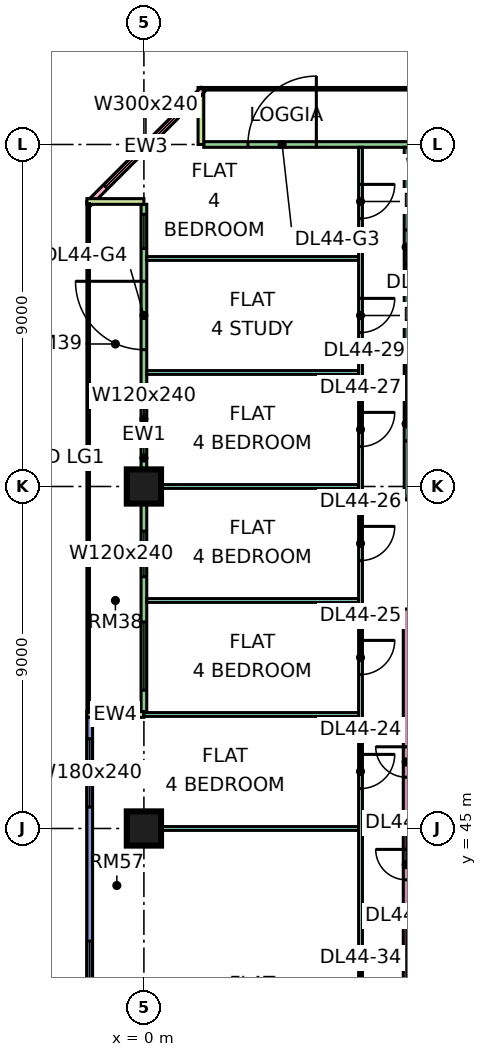
"""IFC4 building model, lengths in metres.
Left out: names, types, materials, properties, quantities, classifications, styles, units other than length and angle.
Written with IfcOpenShell. Run it as: python <this file> out.ifc"""

import sys

from ifc_helpers import new_model, si_unit, direction, frame, frame_2d, origin, origin_2d, place, context, subcontext, project, spatial, rectangle, extrude, element, fill, save


model = new_model("IFC4")
c1 = context("Model", 3, precision=1e-05, world=origin(), true_north=direction((0.0, 1.0)))
c2 = subcontext(c1, "Body", "Model", "MODEL_VIEW")
j1 = project(units=[si_unit("LENGTHUNIT", "METRE"), si_unit("PLANEANGLEUNIT", "RADIAN")], contexts=[c1])
p1 = place(None, origin())
s1 = spatial("IfcSite", under=j1, at=p1, CompositionType="ELEMENT")
p2 = place(p1, origin())
s2 = spatial("IfcBuilding", under=s1, at=p2, CompositionType="ELEMENT")
p3 = place(p2, frame((0.0, 0.0, 191.15)))
s3 = spatial("IfcBuildingStorey", under=s2, at=p3, CompositionType="ELEMENT", Elevation=191.15)
p4 = place(p3, frame((0.0, 45.0, 0.0), z_axis=(0.0, 0.0, 1.0), x_axis=(1.0, 0.0, 0.0)))
e1 = element("IfcColumn", 1, at=p4, inside=s3, PredefinedType="COLUMN", context=c2, shape_type="SweptSolid", body=[
    extrude(rectangle(XDim=0.9, YDim=0.9, at=origin_2d()), origin(), (0.0, 0.0, 1.0), 3.75),
])
p5 = place(p3, frame((0.0, 54.0, 0.0), z_axis=(0.0, 0.0, 1.0), x_axis=(1.0, 0.0, 0.0)))
e2 = element("IfcColumn", 2, at=p5, inside=s3, PredefinedType="COLUMN", context=c2, shape_type="SweptSolid", body=[
    extrude(rectangle(XDim=0.9, YDim=0.9, at=origin_2d()), origin(), (0.0, 0.0, 1.0), 3.75),
])
p6 = place(p3, frame((11.925, 63.0, 0.0), z_axis=(0.0, 0.0, 1.0), x_axis=(-1.0, 0.0, 0.0)))
e3 = element("IfcWall", 3, at=p6, inside=s3, PredefinedType="SOLIDWALL", context=c2, shape_type="SweptSolid", body=[
    extrude(rectangle(XDim=10.35, YDim=0.15, at=frame_2d((5.175, 0.0))), origin(), (0.0, 0.0, 1.0), 3.35),
])
p7 = place(p6, frame((2.775, 0.0, 0.45)))
e4 = element("IfcOpeningElement", 4, at=p7, cuts=e3, PredefinedType="OPENING", context=c2, shape_type="SweptSolid", body=[
    extrude(rectangle(XDim=1.8, YDim=2.4, at=frame_2d((0.9, 1.2))), frame((0.0, 0.085, 0.0), z_axis=(0.0, -1.0, 0.0), x_axis=(1.0, 0.0, 0.0)), (0.0, 0.0, 1.0), 0.17),
])
p8 = place(p6, frame((7.387, 0.0, 0.0)))
e5 = element("IfcOpeningElement", 5, at=p8, cuts=e3, PredefinedType="OPENING", context=c2, shape_type="SweptSolid", body=[
    extrude(rectangle(XDim=1.8, YDim=2.4, at=frame_2d((0.9, 1.2))), frame((0.0, 0.085, 0.0), z_axis=(0.0, -1.0, 0.0), x_axis=(1.0, 0.0, 0.0)), (0.0, 0.0, 1.0), 0.17),
])
p9 = place(p3, frame((1.5, 64.5, 0.0), z_axis=(0.0, 0.0, 1.0), x_axis=(0.0, -1.0, 0.0)))
e6 = element("IfcWall", 6, at=p9, inside=s3, PredefinedType="SOLIDWALL", context=c2, shape_type="SweptSolid", body=[
    extrude(rectangle(XDim=1.5, YDim=0.15, at=frame_2d((0.75, 0.0))), origin(), (0.0, 0.0, 1.0), 3.35),
])
p10 = place(p3, frame((1.553, 64.447, 0.0), z_axis=(0.0, 0.0, 1.0), x_axis=(-0.707106781187, -0.707106781187, 0.0)))
e7 = element("IfcWall", 7, at=p10, inside=s3, PredefinedType="SOLIDWALL", context=c2, shape_type="SweptSolid", body=[
    extrude(rectangle(XDim=4.243, YDim=0.15, at=frame_2d((2.121, 0.0))), origin(), (0.0, 0.0, 1.0), 3.35),
])
p11 = place(p10, frame((0.621, 0.0, 0.45)))
e8 = element("IfcOpeningElement", 8, at=p11, cuts=e7, PredefinedType="OPENING", context=c2, shape_type="SweptSolid", body=[
    extrude(rectangle(XDim=3.0, YDim=2.4, at=frame_2d((1.5, 1.2))), frame((0.0, 0.085, 0.0), z_axis=(0.0, -1.0, 0.0), x_axis=(1.0, 0.0, 0.0)), (0.0, 0.0, 1.0), 0.17),
])
p12 = place(p3, frame((0.0, 61.425, 0.0), z_axis=(0.0, 0.0, 1.0), x_axis=(0.0, -1.0, 0.0)))
e9 = element("IfcWall", 9, at=p12, inside=s3, PredefinedType="SOLIDWALL", context=c2, shape_type="SweptSolid", body=[
    extrude(rectangle(XDim=13.35, YDim=0.15, at=frame_2d((6.675, 0.0))), origin(), (0.0, 0.0, 1.0), 3.35),
])
p13 = place(p12, frame((0.262, 0.0, 0.45)))
e10 = element("IfcOpeningElement", 10, at=p13, cuts=e9, PredefinedType="OPENING", context=c2, shape_type="SweptSolid", body=[
    extrude(rectangle(XDim=0.9, YDim=2.4, at=frame_2d((0.45, 1.2))), frame((0.0, 0.085, 0.0), z_axis=(0.0, -1.0, 0.0), x_axis=(1.0, 0.0, 0.0)), (0.0, 0.0, 1.0), 0.17),
])
p14 = place(p12, frame((2.025, 0.0, 0.0)))
e11 = element("IfcOpeningElement", 11, at=p14, cuts=e9, PredefinedType="OPENING", context=c2, shape_type="SweptSolid", body=[
    extrude(rectangle(XDim=1.8, YDim=2.4, at=frame_2d((0.9, 1.2))), frame((0.0, 0.085, 0.0), z_axis=(0.0, -1.0, 0.0), x_axis=(1.0, 0.0, 0.0)), (0.0, 0.0, 1.0), 0.17),
])
p15 = place(p12, frame((5.05, 0.0, 0.45)))
e12 = element("IfcOpeningElement", 12, at=p15, cuts=e9, PredefinedType="OPENING", context=c2, shape_type="SweptSolid", body=[
    extrude(rectangle(XDim=1.2, YDim=2.4, at=frame_2d((0.6, 1.2))), frame((0.0, 0.085, 0.0), z_axis=(0.0, -1.0, 0.0), x_axis=(1.0, 0.0, 0.0)), (0.0, 0.0, 1.0), 0.17),
])
p16 = place(p12, frame((8.6, 0.0, 0.45)))
e13 = element("IfcOpeningElement", 13, at=p16, cuts=e9, PredefinedType="OPENING", context=c2, shape_type="SweptSolid", body=[
    extrude(rectangle(XDim=1.2, YDim=2.4, at=frame_2d((0.6, 1.2))), frame((0.0, 0.085, 0.0), z_axis=(0.0, -1.0, 0.0), x_axis=(1.0, 0.0, 0.0)), (0.0, 0.0, 1.0), 0.17),
])
p17 = place(p12, frame((10.988, 0.0, 0.45)))
e14 = element("IfcOpeningElement", 14, at=p17, cuts=e9, PredefinedType="OPENING", context=c2, shape_type="SweptSolid", body=[
    extrude(rectangle(XDim=1.8, YDim=2.4, at=frame_2d((0.9, 1.2))), frame((0.0, 0.085, 0.0), z_axis=(0.0, -1.0, 0.0), x_axis=(1.0, 0.0, 0.0)), (0.0, 0.0, 1.0), 0.17),
])
for number, where, z_axis, x_axis in (
    (15, (-1.5, 61.5, 0.0), (0.0, 0.0, 1.0), (1.0, 0.0, 0.0)),
    (16, (-1.5, 48.0, 0.0), (0.0, 0.0, 1.0), (1.0, 0.0, 0.0)),
):
    element("IfcWall", number, at=place(p3, frame(where, z_axis=z_axis, x_axis=x_axis)), inside=s3, PredefinedType="SOLIDWALL", context=c2, shape_type="SweptSolid", body=[
        extrude(rectangle(XDim=1.5, YDim=0.15, at=frame_2d((0.75, 0.0))), origin(), (0.0, 0.0, 1.0), 3.35),
    ])
p18 = place(p3, frame((-1.425, 47.925, 0.0), z_axis=(0.0, 0.0, 1.0), x_axis=(0.0, -1.0, 0.0)))
e17 = element("IfcWall", 17, at=p18, inside=s3, PredefinedType="SOLIDWALL", context=c2, shape_type="SweptSolid", body=[
    extrude(rectangle(XDim=11.85, YDim=0.15, at=frame_2d((5.925, 0.0))), origin(), (0.0, 0.0, 1.0), 3.35),
])
p19 = place(p18, frame((0.562, 0.0, 0.45)))
e18 = element("IfcOpeningElement", 18, at=p19, cuts=e17, PredefinedType="OPENING", context=c2, shape_type="SweptSolid", body=[
    extrude(rectangle(XDim=1.8, YDim=2.4, at=frame_2d((0.9, 1.2))), frame((0.0, 0.085, 0.0), z_axis=(0.0, -1.0, 0.0), x_axis=(1.0, 0.0, 0.0)), (0.0, 0.0, 1.0), 0.17),
])
p20 = place(p18, frame((5.887, 0.0, 0.45)))
e19 = element("IfcOpeningElement", 19, at=p20, cuts=e17, PredefinedType="OPENING", context=c2, shape_type="SweptSolid", body=[
    extrude(rectangle(XDim=3.0, YDim=2.4, at=frame_2d((1.5, 1.2))), frame((0.0, 0.085, 0.0), z_axis=(0.0, -1.0, 0.0), x_axis=(1.0, 0.0, 0.0)), (0.0, 0.0, 1.0), 0.17),
])
e20 = element("IfcWall", 20, at=p4, inside=s3, PredefinedType="PARTITIONING", context=c2, shape_type="SweptSolid", body=[
    extrude(rectangle(XDim=5.65, YDim=0.1, at=frame_2d((2.825, 0.0))), origin(), (0.0, 0.0, 1.0), 3.35),
])
p21 = place(p3, frame((0.0, 48.0, 0.0), z_axis=(0.0, 0.0, 1.0), x_axis=(1.0, 0.0, 0.0)))
e21 = element("IfcWall", 21, at=p21, inside=s3, PredefinedType="PARTITIONING", context=c2, shape_type="SweptSolid", body=[
    extrude(rectangle(XDim=5.65, YDim=0.1, at=frame_2d((2.825, 0.0))), origin(), (0.0, 0.0, 1.0), 3.35),
])
for number, where, z_axis, x_axis in (
    (22, (0.074, 51.0, 0.0), (0.0, 0.0, 1.0), (1.0, 0.0, 0.0)),
    (23, (0.074, 54.0, 0.0), (0.0, 0.0, 1.0), (1.0, 0.0, 0.0)),
    (24, (0.074, 57.0, 0.0), (0.0, 0.0, 1.0), (1.0, 0.0, 0.0)),
    (25, (0.074, 60.0, 0.0), (0.0, 0.0, 1.0), (1.0, 0.0, 0.0)),
):
    element("IfcWall", number, at=place(p3, frame(where, z_axis=z_axis, x_axis=x_axis)), inside=s3, PredefinedType="PARTITIONING", context=c2, shape_type="SweptSolid", body=[
        extrude(rectangle(XDim=5.576, YDim=0.1, at=frame_2d((2.788, 0.0))), origin(), (0.0, 0.0, 1.0), 3.35),
    ])
p22 = place(p3, frame((5.7, 36.1, 0.0), z_axis=(0.0, 0.0, 1.0), x_axis=(0.0, 1.0, 0.0)))
e26 = element("IfcWall", 26, at=p22, inside=s3, PredefinedType="PARTITIONING", context=c2, shape_type="SweptSolid", body=[
    extrude(rectangle(XDim=26.826, YDim=0.1, at=frame_2d((13.413, 0.0))), origin(), (0.0, 0.0, 1.0), 3.35),
])
p23 = place(p22, frame((9.95, 0.0, 0.0)))
e27 = element("IfcOpeningElement", 27, at=p23, cuts=e26, PredefinedType="OPENING", context=c2, shape_type="SweptSolid", body=[
    extrude(rectangle(XDim=0.9, YDim=2.1, at=frame_2d((0.45, 1.05))), frame((0.0, 0.06, 0.0), z_axis=(0.0, -1.0, 0.0), x_axis=(1.0, 0.0, 0.0)), (0.0, 0.0, 1.0), 0.12),
])
p24 = place(p22, frame((12.95, 0.0, 0.0)))
e28 = element("IfcOpeningElement", 28, at=p24, cuts=e26, PredefinedType="OPENING", context=c2, shape_type="SweptSolid", body=[
    extrude(rectangle(XDim=0.9, YDim=2.1, at=frame_2d((0.45, 1.05))), frame((0.0, 0.06, 0.0), z_axis=(0.0, -1.0, 0.0), x_axis=(1.0, 0.0, 0.0)), (0.0, 0.0, 1.0), 0.12),
])
p25 = place(p22, frame((15.95, 0.0, 0.0)))
e29 = element("IfcOpeningElement", 29, at=p25, cuts=e26, PredefinedType="OPENING", context=c2, shape_type="SweptSolid", body=[
    extrude(rectangle(XDim=0.9, YDim=2.1, at=frame_2d((0.45, 1.05))), frame((0.0, 0.06, 0.0), z_axis=(0.0, -1.0, 0.0), x_axis=(1.0, 0.0, 0.0)), (0.0, 0.0, 1.0), 0.12),
])
p26 = place(p22, frame((18.95, 0.0, 0.0)))
e30 = element("IfcOpeningElement", 30, at=p26, cuts=e26, PredefinedType="OPENING", context=c2, shape_type="SweptSolid", body=[
    extrude(rectangle(XDim=0.9, YDim=2.1, at=frame_2d((0.45, 1.05))), frame((0.0, 0.06, 0.0), z_axis=(0.0, -1.0, 0.0), x_axis=(1.0, 0.0, 0.0)), (0.0, 0.0, 1.0), 0.12),
])
p27 = place(p22, frame((24.95, 0.0, 0.0)))
e31 = element("IfcOpeningElement", 31, at=p27, cuts=e26, PredefinedType="OPENING", context=c2, shape_type="SweptSolid", body=[
    extrude(rectangle(XDim=0.9, YDim=2.1, at=frame_2d((0.45, 1.05))), frame((0.0, 0.06, 0.0), z_axis=(0.0, -1.0, 0.0), x_axis=(1.0, 0.0, 0.0)), (0.0, 0.0, 1.0), 0.12),
])
p28 = place(p22, frame((3.95, 0.0, 0.0)))
e32 = element("IfcOpeningElement", 32, at=p28, cuts=e26, PredefinedType="OPENING", context=c2, shape_type="SweptSolid", body=[
    extrude(rectangle(XDim=0.9, YDim=2.1, at=frame_2d((0.45, 1.05))), frame((0.0, 0.06, 0.0), z_axis=(0.0, -1.0, 0.0), x_axis=(1.0, 0.0, 0.0)), (0.0, 0.0, 1.0), 0.12),
])
p29 = place(p22, frame((21.95, 0.0, 0.0)))
e33 = element("IfcOpeningElement", 33, at=p29, cuts=e26, PredefinedType="OPENING", context=c2, shape_type="SweptSolid", body=[
    extrude(rectangle(XDim=0.9, YDim=2.1, at=frame_2d((0.45, 1.05))), frame((0.0, 0.06, 0.0), z_axis=(0.0, -1.0, 0.0), x_axis=(1.0, 0.0, 0.0)), (0.0, 0.0, 1.0), 0.12),
])
p30 = place(p3, frame((6.9, 36.1, 0.0), z_axis=(0.0, 0.0, 1.0), x_axis=(0.0, 1.0, 0.0)))
e34 = element("IfcWall", 34, at=p30, inside=s3, PredefinedType="PARTITIONING", context=c2, shape_type="SweptSolid", body=[
    extrude(rectangle(XDim=14.675, YDim=0.15, at=frame_2d((7.337, 0.0))), origin(), (0.0, 0.0, 1.0), 3.35),
])
p31 = place(p30, frame((7.55, 0.0, 0.0)))
e35 = element("IfcOpeningElement", 35, at=p31, cuts=e34, PredefinedType="OPENING", context=c2, shape_type="SweptSolid", body=[
    extrude(rectangle(XDim=0.8, YDim=2.1, at=frame_2d((0.4, 1.05))), frame((0.0, 0.085, 0.0), z_axis=(0.0, -1.0, 0.0), x_axis=(1.0, 0.0, 0.0)), (0.0, 0.0, 1.0), 0.17),
])
p32 = place(p30, frame((0.65, 0.0, 0.0)))
e36 = element("IfcOpeningElement", 36, at=p32, cuts=e34, PredefinedType="OPENING", context=c2, shape_type="SweptSolid", body=[
    extrude(rectangle(XDim=0.8, YDim=2.1, at=frame_2d((0.4, 1.05))), frame((0.0, 0.085, 0.0), z_axis=(0.0, -1.0, 0.0), x_axis=(1.0, 0.0, 0.0)), (0.0, 0.0, 1.0), 0.17),
])
p33 = place(p30, frame((10.25, 0.0, 0.0)))
e37 = element("IfcOpeningElement", 37, at=p33, cuts=e34, PredefinedType="OPENING", context=c2, shape_type="SweptSolid", body=[
    extrude(rectangle(XDim=0.8, YDim=2.1, at=frame_2d((0.4, 1.05))), frame((0.0, 0.085, 0.0), z_axis=(0.0, -1.0, 0.0), x_axis=(1.0, 0.0, 0.0)), (0.0, 0.0, 1.0), 0.17),
])
p34 = place(p30, frame((3.95, 0.0, 0.0)))
e38 = element("IfcOpeningElement", 38, at=p34, cuts=e34, PredefinedType="OPENING", context=c2, shape_type="SweptSolid", body=[
    extrude(rectangle(XDim=0.9, YDim=2.1, at=frame_2d((0.45, 1.05))), frame((0.0, 0.085, 0.0), z_axis=(0.0, -1.0, 0.0), x_axis=(1.0, 0.0, 0.0)), (0.0, 0.0, 1.0), 0.17),
])
p35 = place(p3, frame((6.9, 53.65, 0.0), z_axis=(0.0, 0.0, 1.0), x_axis=(0.0, 1.0, 0.0)))
e39 = element("IfcWall", 39, at=p35, inside=s3, PredefinedType="PARTITIONING", context=c2, shape_type="SweptSolid", body=[
    extrude(rectangle(XDim=9.276, YDim=0.1, at=frame_2d((4.638, 0.0))), origin(), (0.0, 0.0, 1.0), 3.35),
])
p36 = place(p35, frame((1.55, 0.0, 0.0)))
e40 = element("IfcOpeningElement", 40, at=p36, cuts=e39, PredefinedType="OPENING", context=c2, shape_type="SweptSolid", body=[
    extrude(rectangle(XDim=0.9, YDim=2.1, at=frame_2d((0.45, 1.05))), frame((0.0, 0.06, 0.0), z_axis=(0.0, -1.0, 0.0), x_axis=(1.0, 0.0, 0.0)), (0.0, 0.0, 1.0), 0.12),
])
p37 = place(p35, frame((6.2, 0.0, 0.0)))
e41 = element("IfcOpeningElement", 41, at=p37, cuts=e39, PredefinedType="OPENING", context=c2, shape_type="SweptSolid", body=[
    extrude(rectangle(XDim=0.9, YDim=2.1, at=frame_2d((0.45, 1.05))), frame((0.0, 0.06, 0.0), z_axis=(0.0, -1.0, 0.0), x_axis=(1.0, 0.0, 0.0)), (0.0, 0.0, 1.0), 0.12),
])
p38 = place(p8, frame((1.8, 0.0, 0.0), z_axis=(0.0, 0.0, 1.0), x_axis=(-1.0, 0.0, 0.0)))
e42 = element("IfcDoor", 42, at=p38, inside=s3, OperationType="DOUBLE_DOOR_SINGLE_SWING", PredefinedType="DOOR", context=c2, shape_type="SweptSolid", body=[
    extrude(rectangle(XDim=1.8, YDim=2.4, at=frame_2d((0.9, 1.2))), frame((0.0, 0.025, 0.0), z_axis=(0.0, -1.0, 0.0), x_axis=(1.0, 0.0, 0.0)), (0.0, 0.0, 1.0), 0.05),
])
fill(e5, e42)
p39 = place(p11, origin())
e43 = element("IfcWindow", 43, at=p39, inside=s3, PartitioningType="SINGLE_PANEL", PredefinedType="WINDOW", context=c2, shape_type="SweptSolid", body=[
    extrude(rectangle(XDim=3.0, YDim=2.4, at=frame_2d((1.5, 1.2))), frame((0.0, 0.03, 0.0), z_axis=(0.0, -1.0, 0.0), x_axis=(1.0, 0.0, 0.0)), (0.0, 0.0, 1.0), 0.06),
])
fill(e8, e43)
p40 = place(p13, origin())
e44 = element("IfcWindow", 44, at=p40, inside=s3, PartitioningType="SINGLE_PANEL", PredefinedType="WINDOW", context=c2, shape_type="SweptSolid", body=[
    extrude(rectangle(XDim=0.9, YDim=2.4, at=frame_2d((0.45, 1.2))), frame((0.0, 0.03, 0.0), z_axis=(0.0, -1.0, 0.0), x_axis=(1.0, 0.0, 0.0)), (0.0, 0.0, 1.0), 0.06),
])
fill(e10, e44)
p41 = place(p14, frame((1.8, 0.0, 0.0), z_axis=(0.0, 0.0, 1.0), x_axis=(-1.0, 0.0, 0.0)))
e45 = element("IfcDoor", 45, at=p41, inside=s3, OperationType="DOUBLE_DOOR_SINGLE_SWING", PredefinedType="DOOR", context=c2, shape_type="SweptSolid", body=[
    extrude(rectangle(XDim=1.8, YDim=2.4, at=frame_2d((0.9, 1.2))), frame((0.0, 0.025, 0.0), z_axis=(0.0, -1.0, 0.0), x_axis=(1.0, 0.0, 0.0)), (0.0, 0.0, 1.0), 0.05),
])
fill(e11, e45)
p42 = place(p15, origin())
e46 = element("IfcWindow", 46, at=p42, inside=s3, PartitioningType="SINGLE_PANEL", PredefinedType="WINDOW", context=c2, shape_type="SweptSolid", body=[
    extrude(rectangle(XDim=1.2, YDim=2.4, at=frame_2d((0.6, 1.2))), frame((0.0, 0.03, 0.0), z_axis=(0.0, -1.0, 0.0), x_axis=(1.0, 0.0, 0.0)), (0.0, 0.0, 1.0), 0.06),
])
fill(e12, e46)
p43 = place(p16, origin())
e47 = element("IfcWindow", 47, at=p43, inside=s3, PartitioningType="SINGLE_PANEL", PredefinedType="WINDOW", context=c2, shape_type="SweptSolid", body=[
    extrude(rectangle(XDim=1.2, YDim=2.4, at=frame_2d((0.6, 1.2))), frame((0.0, 0.03, 0.0), z_axis=(0.0, -1.0, 0.0), x_axis=(1.0, 0.0, 0.0)), (0.0, 0.0, 1.0), 0.06),
])
fill(e13, e47)
p44 = place(p17, origin())
e48 = element("IfcWindow", 48, at=p44, inside=s3, PartitioningType="SINGLE_PANEL", PredefinedType="WINDOW", context=c2, shape_type="SweptSolid", body=[
    extrude(rectangle(XDim=1.8, YDim=2.4, at=frame_2d((0.9, 1.2))), frame((0.0, 0.03, 0.0), z_axis=(0.0, -1.0, 0.0), x_axis=(1.0, 0.0, 0.0)), (0.0, 0.0, 1.0), 0.06),
])
fill(e14, e48)
p45 = place(p19, origin())
e49 = element("IfcWindow", 49, at=p45, inside=s3, PartitioningType="SINGLE_PANEL", PredefinedType="WINDOW", context=c2, shape_type="SweptSolid", body=[
    extrude(rectangle(XDim=1.8, YDim=2.4, at=frame_2d((0.9, 1.2))), frame((0.0, 0.03, 0.0), z_axis=(0.0, -1.0, 0.0), x_axis=(1.0, 0.0, 0.0)), (0.0, 0.0, 1.0), 0.06),
])
fill(e18, e49)
p46 = place(p20, origin())
e50 = element("IfcWindow", 50, at=p46, inside=s3, PartitioningType="SINGLE_PANEL", PredefinedType="WINDOW", context=c2, shape_type="SweptSolid", body=[
    extrude(rectangle(XDim=3.0, YDim=2.4, at=frame_2d((1.5, 1.2))), frame((0.0, 0.03, 0.0), z_axis=(0.0, -1.0, 0.0), x_axis=(1.0, 0.0, 0.0)), (0.0, 0.0, 1.0), 0.06),
])
fill(e19, e50)
p47 = place(p31, frame((0.8, 0.0, 0.0), z_axis=(0.0, 0.0, 1.0), x_axis=(-1.0, 0.0, 0.0)))
e51 = element("IfcDoor", 51, at=p47, inside=s3, OperationType="SINGLE_SWING_RIGHT", PredefinedType="DOOR", context=c2, shape_type="SweptSolid", body=[
    extrude(rectangle(XDim=0.8, YDim=2.1, at=frame_2d((0.4, 1.05))), frame((0.0, 0.025, 0.0), z_axis=(0.0, -1.0, 0.0), x_axis=(1.0, 0.0, 0.0)), (0.0, 0.0, 1.0), 0.05),
])
fill(e35, e51)
p48 = place(p23, origin())
e52 = element("IfcDoor", 52, at=p48, inside=s3, OperationType="SINGLE_SWING_RIGHT", PredefinedType="DOOR", context=c2, shape_type="SweptSolid", body=[
    extrude(rectangle(XDim=0.9, YDim=2.1, at=frame_2d((0.45, 1.05))), frame((0.0, 0.025, 0.0), z_axis=(0.0, -1.0, 0.0), x_axis=(1.0, 0.0, 0.0)), (0.0, 0.0, 1.0), 0.05),
])
fill(e27, e52)
p49 = place(p24, origin())
e53 = element("IfcDoor", 53, at=p49, inside=s3, OperationType="SINGLE_SWING_RIGHT", PredefinedType="DOOR", context=c2, shape_type="SweptSolid", body=[
    extrude(rectangle(XDim=0.9, YDim=2.1, at=frame_2d((0.45, 1.05))), frame((0.0, 0.025, 0.0), z_axis=(0.0, -1.0, 0.0), x_axis=(1.0, 0.0, 0.0)), (0.0, 0.0, 1.0), 0.05),
])
fill(e28, e53)
p50 = place(p25, origin())
e54 = element("IfcDoor", 54, at=p50, inside=s3, OperationType="SINGLE_SWING_RIGHT", PredefinedType="DOOR", context=c2, shape_type="SweptSolid", body=[
    extrude(rectangle(XDim=0.9, YDim=2.1, at=frame_2d((0.45, 1.05))), frame((0.0, 0.025, 0.0), z_axis=(0.0, -1.0, 0.0), x_axis=(1.0, 0.0, 0.0)), (0.0, 0.0, 1.0), 0.05),
])
fill(e29, e54)
p51 = place(p26, origin())
e55 = element("IfcDoor", 55, at=p51, inside=s3, OperationType="SINGLE_SWING_RIGHT", PredefinedType="DOOR", context=c2, shape_type="SweptSolid", body=[
    extrude(rectangle(XDim=0.9, YDim=2.1, at=frame_2d((0.45, 1.05))), frame((0.0, 0.025, 0.0), z_axis=(0.0, -1.0, 0.0), x_axis=(1.0, 0.0, 0.0)), (0.0, 0.0, 1.0), 0.05),
])
fill(e30, e55)
p52 = place(p27, origin())
e56 = element("IfcDoor", 56, at=p52, inside=s3, OperationType="SINGLE_SWING_RIGHT", PredefinedType="DOOR", context=c2, shape_type="SweptSolid", body=[
    extrude(rectangle(XDim=0.9, YDim=2.1, at=frame_2d((0.45, 1.05))), frame((0.0, 0.025, 0.0), z_axis=(0.0, -1.0, 0.0), x_axis=(1.0, 0.0, 0.0)), (0.0, 0.0, 1.0), 0.05),
])
fill(e31, e56)
p53 = place(p36, frame((0.9, 0.0, 0.0), z_axis=(0.0, 0.0, 1.0), x_axis=(-1.0, 0.0, 0.0)))
e57 = element("IfcDoor", 57, at=p53, inside=s3, OperationType="SINGLE_SWING_LEFT", PredefinedType="DOOR", context=c2, shape_type="SweptSolid", body=[
    extrude(rectangle(XDim=0.9, YDim=2.1, at=frame_2d((0.45, 1.05))), frame((0.0, 0.025, 0.0), z_axis=(0.0, -1.0, 0.0), x_axis=(1.0, 0.0, 0.0)), (0.0, 0.0, 1.0), 0.05),
])
fill(e40, e57)
p54 = place(p37, frame((0.9, 0.0, 0.0), z_axis=(0.0, 0.0, 1.0), x_axis=(-1.0, 0.0, 0.0)))
e58 = element("IfcDoor", 58, at=p54, inside=s3, OperationType="SINGLE_SWING_LEFT", PredefinedType="DOOR", context=c2, shape_type="SweptSolid", body=[
    extrude(rectangle(XDim=0.9, YDim=2.1, at=frame_2d((0.45, 1.05))), frame((0.0, 0.025, 0.0), z_axis=(0.0, -1.0, 0.0), x_axis=(1.0, 0.0, 0.0)), (0.0, 0.0, 1.0), 0.05),
])
fill(e41, e58)
p55 = place(p33, frame((0.8, 0.0, 0.0), z_axis=(0.0, 0.0, 1.0), x_axis=(-1.0, 0.0, 0.0)))
e59 = element("IfcDoor", 59, at=p55, inside=s3, OperationType="SINGLE_SWING_RIGHT", PredefinedType="DOOR", context=c2, shape_type="SweptSolid", body=[
    extrude(rectangle(XDim=0.8, YDim=2.1, at=frame_2d((0.4, 1.05))), frame((0.0, 0.025, 0.0), z_axis=(0.0, -1.0, 0.0), x_axis=(1.0, 0.0, 0.0)), (0.0, 0.0, 1.0), 0.05),
])
fill(e37, e59)
p56 = place(p29, origin())
e60 = element("IfcDoor", 60, at=p56, inside=s3, OperationType="SINGLE_SWING_RIGHT", PredefinedType="DOOR", context=c2, shape_type="SweptSolid", body=[
    extrude(rectangle(XDim=0.9, YDim=2.1, at=frame_2d((0.45, 1.05))), frame((0.0, 0.025, 0.0), z_axis=(0.0, -1.0, 0.0), x_axis=(1.0, 0.0, 0.0)), (0.0, 0.0, 1.0), 0.05),
])
fill(e33, e60)
save(model, sys.argv[1])
